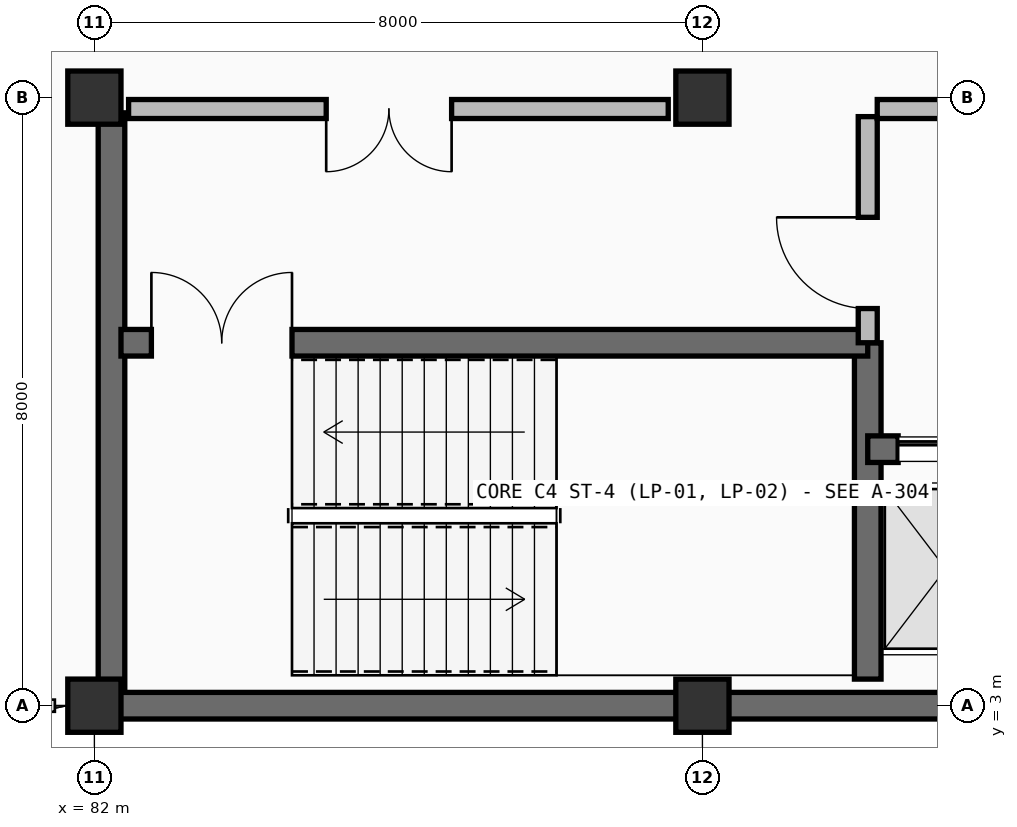
"""IFC4 building model, lengths in metres.
Left out: names, types, materials, properties, quantities, classifications, styles, units other than length and angle.
Written with IfcOpenShell. Run it as: python <this file> out.ifc"""

import sys

from ifc_helpers import new_model, si_unit, direction, frame, frame_2d, origin, origin_2d, place, context, subcontext, project, spatial, rectangle, extrude, element, fill, save


model = new_model("IFC4")
c1 = context("Model", 3, precision=1e-05, world=origin(), true_north=direction((0.0, 1.0)))
c2 = subcontext(c1, "Body", "Model", "MODEL_VIEW")
j1 = project(units=[si_unit("LENGTHUNIT", "METRE"), si_unit("PLANEANGLEUNIT", "RADIAN")], contexts=[c1])
p1 = place(None, origin())
s1 = spatial("IfcSite", under=j1, at=p1, CompositionType="ELEMENT")
p2 = place(p1, origin())
s2 = spatial("IfcBuilding", under=s1, at=p2, CompositionType="ELEMENT")
p3 = place(p2, frame((0.0, 0.0, 9.9)))
s3 = spatial("IfcBuildingStorey", under=s2, at=p3, CompositionType="ELEMENT", Elevation=9.9)
for number, where, z_axis, x_axis in (
    (1, (82.0, 3.0, 0.0), (0.0, 0.0, 1.0), (1.0, 0.0, 0.0)),
    (2, (82.0, 11.0, 0.0), (0.0, 0.0, 1.0), (1.0, 0.0, 0.0)),
    (3, (90.0, 3.0, 0.0), (0.0, 0.0, 1.0), (1.0, 0.0, 0.0)),
    (4, (90.0, 11.0, 0.0), (0.0, 0.0, 1.0), (1.0, 0.0, 0.0)),
):
    element("IfcColumn", number, at=place(p3, frame(where, z_axis=z_axis, x_axis=x_axis)), inside=s3, PredefinedType="COLUMN", context=c2, shape_type="SweptSolid", body=[
        extrude(rectangle(XDim=0.7, YDim=0.7, at=origin_2d()), origin(), (0.0, 0.0, 1.0), 4.5),
    ])
for number, where, z_axis, x_axis in (
    (5, (98.0, 3.0, 0.0), (0.0, 0.0, 1.0), (-1.0, 0.0, 0.0)),
    (6, (90.0, 3.0, 0.0), (0.0, 0.0, 1.0), (-1.0, 0.0, 0.0)),
):
    element("IfcWall", number, at=place(p3, frame(where, z_axis=z_axis, x_axis=x_axis)), inside=s3, PredefinedType="SHEAR", context=c2, shape_type="SweptSolid", body=[
        extrude(rectangle(XDim=8.0, YDim=0.35, at=frame_2d((4.0, 0.0))), origin(), (0.0, 0.0, 1.0), 4.5),
    ])
p4 = place(p3, frame((82.225, 3.2, 0.0), z_axis=(0.0, 0.0, 1.0), x_axis=(0.0, 1.0, 0.0)))
e7 = element("IfcWall", 7, at=p4, inside=s3, PredefinedType="SHEAR", context=c2, shape_type="SweptSolid", body=[
    extrude(rectangle(XDim=7.6, YDim=0.35, at=frame_2d((3.8, 0.0))), origin(), (0.0, 0.0, 1.0), 4.2),
])
p5 = place(p3, frame((92.175, 3.35, 0.0), z_axis=(0.0, 0.0, 1.0), x_axis=(0.0, 1.0, 0.0)))
e8 = element("IfcWall", 8, at=p5, inside=s3, PredefinedType="SHEAR", context=c2, shape_type="SweptSolid", body=[
    extrude(rectangle(XDim=4.425, YDim=0.35, at=frame_2d((2.212, 0.0))), origin(), (0.0, 0.0, 1.0), 4.2),
])
p6 = place(p3, frame((82.35, 7.775, 0.0), z_axis=(0.0, 0.0, 1.0), x_axis=(1.0, 0.0, 0.0)))
e9 = element("IfcWall", 9, at=p6, inside=s3, PredefinedType="SHEAR", context=c2, shape_type="SweptSolid", body=[
    extrude(rectangle(XDim=9.825, YDim=0.35, at=frame_2d((4.913, 0.0))), origin(), (0.0, 0.0, 1.0), 4.2),
])
p7 = place(p6, frame((0.4, 0.0, 0.0)))
e10 = element("IfcOpeningElement", 10, at=p7, cuts=e9, PredefinedType="OPENING", context=c2, shape_type="SweptSolid", body=[
    extrude(rectangle(XDim=1.85, YDim=2.25, at=frame_2d((0.925, 1.125))), frame((0.0, 0.185, 0.0), z_axis=(0.0, -1.0, 0.0), x_axis=(1.0, 0.0, 0.0)), (0.0, 0.0, 1.0), 0.37),
])
p8 = place(p3, frame((92.175, 6.375, 0.0), z_axis=(0.0, 0.0, 1.0), x_axis=(1.0, 0.0, 0.0)))
e11 = element("IfcWall", 11, at=p8, inside=s3, PredefinedType="SHEAR", context=c2, shape_type="SweptSolid", body=[
    extrude(rectangle(XDim=5.475, YDim=0.35, at=frame_2d((2.737, 0.0))), origin(), (0.0, 0.0, 1.0), 4.2),
])
p9 = place(p8, frame((0.4, 0.0, 0.0)))
e12 = element("IfcOpeningElement", 12, at=p9, cuts=e11, PredefinedType="OPENING", context=c2, shape_type="SweptSolid", body=[
    extrude(rectangle(XDim=1.25, YDim=2.25, at=frame_2d((0.625, 1.125))), frame((0.0, 0.185, 0.0), z_axis=(0.0, -1.0, 0.0), x_axis=(1.0, 0.0, 0.0)), (0.0, 0.0, 1.0), 0.37),
])
p10 = place(p8, frame((3.275, 0.0, 0.0)))
e13 = element("IfcOpeningElement", 13, at=p10, cuts=e11, PredefinedType="OPENING", context=c2, shape_type="SweptSolid", body=[
    extrude(rectangle(XDim=1.1, YDim=2.2, at=frame_2d((0.55, 1.1))), frame((0.0, 0.185, 0.0), z_axis=(0.0, -1.0, 0.0), x_axis=(1.0, 0.0, 0.0)), (0.0, 0.0, 1.0), 0.37),
])
p11 = place(p3, frame((92.175, 7.775, 0.0), z_axis=(0.0, 0.0, 1.0), x_axis=(0.0, 1.0, 0.0)))
e14 = element("IfcWall", 14, at=p11, inside=s3, PredefinedType="PARTITIONING", context=c2, shape_type="SweptSolid", body=[
    extrude(rectangle(XDim=2.975, YDim=0.25, at=frame_2d((1.488, 0.0))), origin(), (0.0, 0.0, 1.0), 4.2),
])
p12 = place(p11, frame((0.45, 0.0, 0.0)))
e15 = element("IfcOpeningElement", 15, at=p12, cuts=e14, PredefinedType="OPENING", context=c2, shape_type="SweptSolid", body=[
    extrude(rectangle(XDim=1.2, YDim=2.2, at=frame_2d((0.6, 1.1))), frame((0.0, 0.135, 0.0), z_axis=(0.0, -1.0, 0.0), x_axis=(1.0, 0.0, 0.0)), (0.0, 0.0, 1.0), 0.27),
])
p13 = place(p3, frame((82.45, 10.85, 0.0), z_axis=(0.0, 0.0, 1.0), x_axis=(1.0, 0.0, 0.0)))
e16 = element("IfcWall", 16, at=p13, inside=s3, PredefinedType="PARTITIONING", context=c2, shape_type="SweptSolid", body=[
    extrude(rectangle(XDim=7.1, YDim=0.25, at=frame_2d((3.55, 0.0))), origin(), (0.0, 0.0, 1.0), 3.535),
])
p14 = place(p13, frame((2.6, 0.0, 0.0)))
e17 = element("IfcOpeningElement", 17, at=p14, cuts=e16, PredefinedType="OPENING", context=c2, shape_type="SweptSolid", body=[
    extrude(rectangle(XDim=1.65, YDim=2.25, at=frame_2d((0.825, 1.125))), frame((0.0, 0.135, 0.0), z_axis=(0.0, -1.0, 0.0), x_axis=(1.0, 0.0, 0.0)), (0.0, 0.0, 1.0), 0.27),
])
p15 = place(p3, frame((92.3, 10.85, 0.0), z_axis=(0.0, 0.0, 1.0), x_axis=(1.0, 0.0, 0.0)))
e18 = element("IfcWall", 18, at=p15, inside=s3, PredefinedType="PARTITIONING", context=c2, shape_type="SweptSolid", body=[
    extrude(rectangle(XDim=5.25, YDim=0.25, at=frame_2d((2.625, 0.0))), origin(), (0.0, 0.0, 1.0), 3.535),
])
p16 = place(p15, frame((1.85, 0.0, 0.0)))
e19 = element("IfcOpeningElement", 19, at=p16, cuts=e18, PredefinedType="OPENING", context=c2, shape_type="SweptSolid", body=[
    extrude(rectangle(XDim=1.5, YDim=2.2, at=frame_2d((0.75, 1.1))), frame((0.0, 0.135, 0.0), z_axis=(0.0, -1.0, 0.0), x_axis=(1.0, 0.0, 0.0)), (0.0, 0.0, 1.0), 0.27),
])
p17 = place(p7, origin())
e20 = element("IfcDoor", 20, at=p17, inside=s3, OperationType="DOUBLE_DOOR_SINGLE_SWING", PredefinedType="DOOR", context=c2, shape_type="SweptSolid", body=[
    extrude(rectangle(XDim=1.85, YDim=2.25, at=frame_2d((0.925, 1.125))), frame((0.0, 0.025, 0.0), z_axis=(0.0, -1.0, 0.0), x_axis=(1.0, 0.0, 0.0)), (0.0, 0.0, 1.0), 0.05),
])
fill(e10, e20)
p18 = place(p9, origin())
e21 = element("IfcDoor", 21, at=p18, inside=s3, OperationType="DOUBLE_DOOR_SLIDING", PredefinedType="DOOR", context=c2, shape_type="SweptSolid", body=[
    extrude(rectangle(XDim=1.25, YDim=2.25, at=frame_2d((0.625, 1.125))), frame((0.0, 0.025, 0.0), z_axis=(0.0, -1.0, 0.0), x_axis=(1.0, 0.0, 0.0)), (0.0, 0.0, 1.0), 0.05),
])
fill(e12, e21)
p19 = place(p12, origin())
e22 = element("IfcDoor", 22, at=p19, inside=s3, OperationType="SINGLE_SWING_RIGHT", PredefinedType="DOOR", context=c2, shape_type="SweptSolid", body=[
    extrude(rectangle(XDim=1.2, YDim=2.2, at=frame_2d((0.6, 1.1))), frame((0.0, 0.025, 0.0), z_axis=(0.0, -1.0, 0.0), x_axis=(1.0, 0.0, 0.0)), (0.0, 0.0, 1.0), 0.05),
])
fill(e15, e22)
p20 = place(p14, frame((1.65, 0.0, 0.0), z_axis=(0.0, 0.0, 1.0), x_axis=(-1.0, 0.0, 0.0)))
e23 = element("IfcDoor", 23, at=p20, inside=s3, OperationType="DOUBLE_DOOR_SINGLE_SWING", PredefinedType="DOOR", context=c2, shape_type="SweptSolid", body=[
    extrude(rectangle(XDim=1.65, YDim=2.25, at=frame_2d((0.825, 1.125))), frame((0.0, 0.025, 0.0), z_axis=(0.0, -1.0, 0.0), x_axis=(1.0, 0.0, 0.0)), (0.0, 0.0, 1.0), 0.05),
])
fill(e17, e23)
save(model, sys.argv[1])
